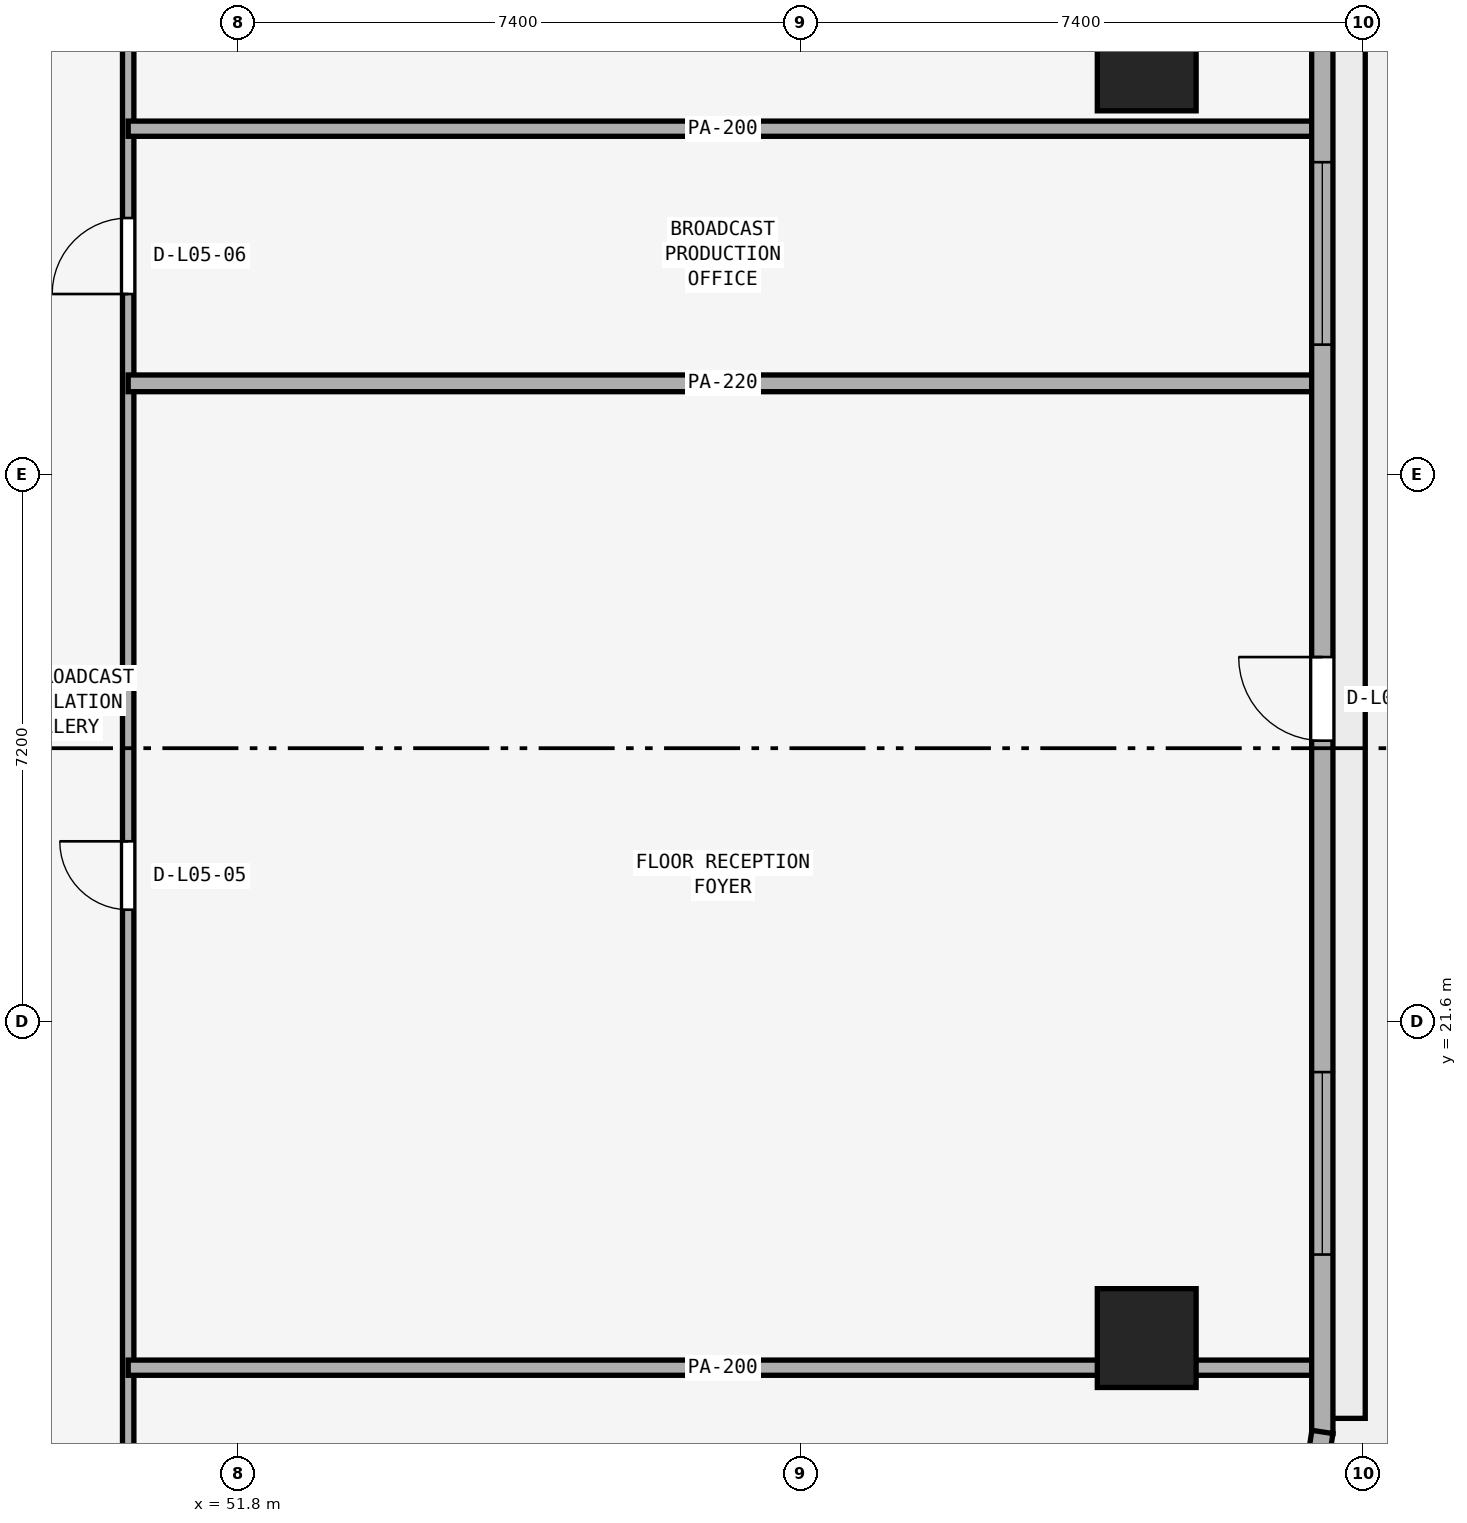
"""IFC4 building model, lengths in metres.
Left out: names, types, materials, properties, quantities, classifications, styles, units other than length and angle.
Written with IfcOpenShell. Run it as: python <this file> out.ifc"""

import sys

from ifc_helpers import new_model, si_unit, direction, frame, frame_2d, origin, origin_2d, place, context, subcontext, project, spatial, rectangle, extrude, element, fill, save


model = new_model("IFC4")
c1 = context("Model", 3, precision=1e-05, world=origin(), true_north=direction((0.0, 1.0)))
c2 = subcontext(c1, "Body", "Model", "MODEL_VIEW")
j1 = project(units=[si_unit("LENGTHUNIT", "METRE"), si_unit("PLANEANGLEUNIT", "RADIAN")], contexts=[c1])
p1 = place(None, origin())
s1 = spatial("IfcSite", under=j1, at=p1, CompositionType="ELEMENT")
p2 = place(p1, origin())
s2 = spatial("IfcBuilding", under=s1, at=p2, CompositionType="ELEMENT")
p3 = place(p2, frame((0.0, 0.0, 25.0)))
s3 = spatial("IfcBuildingStorey", under=s2, at=p3, CompositionType="ELEMENT", Elevation=25.0)
for number, where, z_axis, x_axis in (
    (1, (63.75, 17.44, 0.0), (0.0, 0.0, 1.0), (1.0, 0.0, 0.0)),
    (2, (63.75, 34.235, 0.0), (0.0, 0.0, 1.0), (1.0, 0.0, 0.0)),
):
    element("IfcColumn", number, at=place(p3, frame(where, z_axis=z_axis, x_axis=x_axis)), inside=s3, PredefinedType="COLUMN", context=c2, shape_type="SweptSolid", body=[
        extrude(rectangle(XDim=1.3, YDim=1.3, at=origin_2d()), origin(), (0.0, 0.0, 1.0), 3.8),
    ])
p4 = place(p3, frame((50.35, 15.25, 0.0), z_axis=(0.0, 0.0, 1.0), x_axis=(0.0, 1.0, 0.0)))
e3 = element("IfcWall", 3, at=p4, inside=s3, PredefinedType="PARTITIONING", context=c2, shape_type="SweptSolid", body=[
    extrude(rectangle(XDim=19.9, YDim=0.15, at=frame_2d((9.95, 0.0))), origin(), (0.0, 0.0, 1.0), 3.525),
])
p5 = place(p4, frame((7.825, 0.0, 0.0)))
e4 = element("IfcOpeningElement", 4, at=p5, cuts=e3, PredefinedType="OPENING", context=c2, shape_type="SweptSolid", body=[
    extrude(rectangle(XDim=0.9, YDim=2.1, at=frame_2d((0.45, 1.05))), frame((0.0, 0.085, 0.0), z_axis=(0.0, -1.0, 0.0), x_axis=(1.0, 0.0, 0.0)), (0.0, 0.0, 1.0), 0.17),
])
p6 = place(p4, frame((15.925, 0.0, 0.0)))
e5 = element("IfcOpeningElement", 5, at=p6, cuts=e3, PredefinedType="OPENING", context=c2, shape_type="SweptSolid", body=[
    extrude(rectangle(XDim=1.0, YDim=2.12, at=frame_2d((0.5, 1.06))), frame((0.0, 0.085, 0.0), z_axis=(0.0, -1.0, 0.0), x_axis=(1.0, 0.0, 0.0)), (0.0, 0.0, 1.0), 0.17),
])
p7 = place(p3, frame((50.35, 17.05, 0.0), z_axis=(0.0, 0.0, 1.0), x_axis=(1.0, 0.0, 0.0)))
e6 = element("IfcWall", 6, at=p7, inside=s3, PredefinedType="PARTITIONING", context=c2, shape_type="SweptSolid", body=[
    extrude(rectangle(XDim=15.645, YDim=0.2, at=frame_2d((7.823, 0.0))), origin(), (0.0, 0.0, 1.0), 3.525),
])
p8 = place(p3, frame((50.35, 30.0, 0.0), z_axis=(0.0, 0.0, 1.0), x_axis=(1.0, 0.0, 0.0)))
e7 = element("IfcWall", 7, at=p8, inside=s3, PredefinedType="PARTITIONING", context=c2, shape_type="SweptSolid", body=[
    extrude(rectangle(XDim=15.645, YDim=0.22, at=frame_2d((7.823, 0.0))), origin(), (0.0, 0.0, 1.0), 3.525),
])
p9 = place(p3, frame((50.35, 33.35, 0.0), z_axis=(0.0, 0.0, 1.0), x_axis=(1.0, 0.0, 0.0)))
e8 = element("IfcWall", 8, at=p9, inside=s3, PredefinedType="PARTITIONING", context=c2, shape_type="SweptSolid", body=[
    extrude(rectangle(XDim=15.645, YDim=0.2, at=frame_2d((7.823, 0.0))), origin(), (0.0, 0.0, 1.0), 2.908),
])
p10 = place(p3, frame((66.06, 16.183, 0.0), z_axis=(0.0, 0.0, 1.0), x_axis=(0.0, 1.0, 0.0)))
e9 = element("IfcWall", 9, at=p10, inside=s3, PredefinedType="STANDARD", context=c2, shape_type="SweptSolid", body=[
    extrude(rectangle(XDim=19.331, YDim=0.28, at=frame_2d((9.666, 0.0))), origin(), (0.0, 0.0, 1.0), 3.525),
])
p11 = place(p10, frame((9.115, 0.0, 0.0)))
e10 = element("IfcOpeningElement", 10, at=p11, cuts=e9, PredefinedType="OPENING", context=c2, shape_type="SweptSolid", body=[
    extrude(rectangle(XDim=1.1, YDim=2.2, at=frame_2d((0.55, 1.1))), frame((0.0, 0.15, 0.0), z_axis=(0.0, -1.0, 0.0), x_axis=(1.0, 0.0, 0.0)), (0.0, 0.0, 1.0), 0.3),
])
p12 = place(p10, frame((2.355, 0.0, 0.9)))
e11 = element("IfcOpeningElement", 11, at=p12, cuts=e9, PredefinedType="OPENING", context=c2, shape_type="SweptSolid", body=[
    extrude(rectangle(XDim=2.4, YDim=1.75, at=frame_2d((1.2, 0.875))), frame((0.0, 0.15, 0.0), z_axis=(0.0, -1.0, 0.0), x_axis=(1.0, 0.0, 0.0)), (0.0, 0.0, 1.0), 0.3),
])
p13 = place(p10, frame((14.326, 0.0, 0.9)))
e12 = element("IfcOpeningElement", 12, at=p13, cuts=e9, PredefinedType="OPENING", context=c2, shape_type="SweptSolid", body=[
    extrude(rectangle(XDim=2.4, YDim=1.75, at=frame_2d((1.2, 0.875))), frame((0.0, 0.15, 0.0), z_axis=(0.0, -1.0, 0.0), x_axis=(1.0, 0.0, 0.0)), (0.0, 0.0, 1.0), 0.3),
])
p14 = place(p3, frame((65.867, 14.943, 0.0), z_axis=(0.0, 0.0, 1.0), x_axis=(0.152014078361, 0.988378328364, 0.0)))
e13 = element("IfcWall", 13, at=p14, inside=s3, PredefinedType="STANDARD", context=c2, shape_type="SweptSolid", body=[
    extrude(rectangle(XDim=1.277, YDim=0.28, at=frame_2d((0.638, 0.0))), origin(), (0.0, 0.0, 1.0), 3.525),
])
p15 = place(p5, origin())
e14 = element("IfcDoor", 14, at=p15, inside=s3, OperationType="SINGLE_SWING_RIGHT", PredefinedType="DOOR", context=c2, shape_type="SweptSolid", body=[
    extrude(rectangle(XDim=0.9, YDim=2.1, at=frame_2d((0.45, 1.05))), frame((0.0, 0.025, 0.0), z_axis=(0.0, -1.0, 0.0), x_axis=(1.0, 0.0, 0.0)), (0.0, 0.0, 1.0), 0.05),
])
fill(e4, e14)
p16 = place(p6, origin())
e15 = element("IfcDoor", 15, at=p16, inside=s3, OperationType="SINGLE_SWING_LEFT", PredefinedType="DOOR", context=c2, shape_type="SweptSolid", body=[
    extrude(rectangle(XDim=1.0, YDim=2.12, at=frame_2d((0.5, 1.06))), frame((0.0, 0.025, 0.0), z_axis=(0.0, -1.0, 0.0), x_axis=(1.0, 0.0, 0.0)), (0.0, 0.0, 1.0), 0.05),
])
fill(e5, e15)
p17 = place(p11, origin())
e16 = element("IfcDoor", 16, at=p17, inside=s3, OperationType="SINGLE_SWING_RIGHT", PredefinedType="DOOR", context=c2, shape_type="SweptSolid", body=[
    extrude(rectangle(XDim=1.1, YDim=2.2, at=frame_2d((0.55, 1.1))), frame((0.0, 0.025, 0.0), z_axis=(0.0, -1.0, 0.0), x_axis=(1.0, 0.0, 0.0)), (0.0, 0.0, 1.0), 0.05),
])
fill(e10, e16)
p18 = place(p12, origin())
e17 = element("IfcWindow", 17, at=p18, inside=s3, PartitioningType="SINGLE_PANEL", PredefinedType="WINDOW", context=c2, shape_type="SweptSolid", body=[
    extrude(rectangle(XDim=2.4, YDim=1.75, at=frame_2d((1.2, 0.875))), frame((0.0, 0.03, 0.0), z_axis=(0.0, -1.0, 0.0), x_axis=(1.0, 0.0, 0.0)), (0.0, 0.0, 1.0), 0.06),
])
fill(e11, e17)
p19 = place(p13, origin())
e18 = element("IfcWindow", 18, at=p19, inside=s3, PartitioningType="SINGLE_PANEL", PredefinedType="WINDOW", context=c2, shape_type="SweptSolid", body=[
    extrude(rectangle(XDim=2.4, YDim=1.75, at=frame_2d((1.2, 0.875))), frame((0.0, 0.03, 0.0), z_axis=(0.0, -1.0, 0.0), x_axis=(1.0, 0.0, 0.0)), (0.0, 0.0, 1.0), 0.06),
])
fill(e12, e18)
save(model, sys.argv[1])
